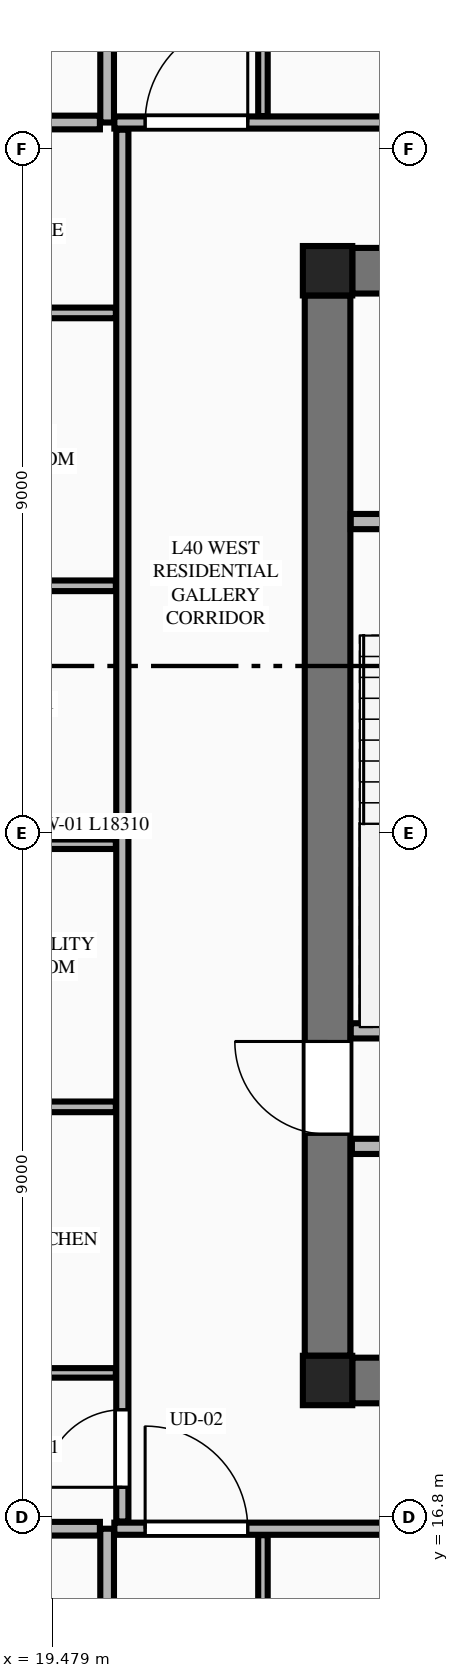
"""IFC4 building model, lengths in metres.
Left out: names, types, materials, properties, quantities, classifications, styles, units other than length and angle.
Written with IfcOpenShell. Run it as: python <this file> out.ifc"""

import sys

from ifc_helpers import new_model, si_unit, direction, frame, frame_2d, origin, origin_2d, place, context, subcontext, project, spatial, rectangle, extrude, element, fill, save


model = new_model("IFC4")
c1 = context("Model", 3, precision=1e-05, world=origin(), true_north=direction((0.0, 1.0)))
c2 = subcontext(c1, "Body", "Model", "MODEL_VIEW")
j1 = project(units=[si_unit("LENGTHUNIT", "METRE"), si_unit("PLANEANGLEUNIT", "RADIAN")], contexts=[c1])
p1 = place(None, origin())
s1 = spatial("IfcSite", under=j1, at=p1, CompositionType="ELEMENT")
p2 = place(p1, origin())
s2 = spatial("IfcBuilding", under=s1, at=p2, CompositionType="ELEMENT")
p3 = place(p2, frame((0.0, 0.0, 153.5)))
s3 = spatial("IfcBuildingStorey", under=s2, at=p3, CompositionType="ELEMENT", Elevation=153.5)
for number, where, z_axis, x_axis in (
    (1, (23.1, 18.6, 0.0), (0.0, 0.0, 1.0), (1.0, 0.0, 0.0)),
    (2, (23.1, 33.2, 0.0), (0.0, 0.0, 1.0), (1.0, 0.0, 0.0)),
):
    element("IfcColumn", number, at=place(p3, frame(where, z_axis=z_axis, x_axis=x_axis)), inside=s3, PredefinedType="COLUMN", context=c2, shape_type="SweptSolid", body=[
        extrude(rectangle(XDim=0.65, YDim=0.65, at=origin_2d()), origin(), (0.0, 0.0, 1.0), 3.55),
    ])
for number, where, z_axis, x_axis in (
    (3, (23.425, 18.6, 0.0), (0.0, 0.0, 1.0), (1.0, 0.0, 0.0)),
    (4, (23.425, 33.2, 0.0), (0.0, 0.0, 1.0), (1.0, 0.0, 0.0)),
):
    element("IfcWall", number, at=place(p3, frame(where, z_axis=z_axis, x_axis=x_axis)), inside=s3, PredefinedType="SHEAR", context=c2, shape_type="SweptSolid", body=[
        extrude(rectangle(XDim=17.95, YDim=0.6, at=frame_2d((8.975, 0.0))), origin(), (0.0, 0.0, 1.0), 3.34),
    ])
p4 = place(p3, frame((23.1, 18.925, 0.0), z_axis=(0.0, 0.0, 1.0), x_axis=(0.0, 1.0, 0.0)))
e5 = element("IfcWall", 5, at=p4, inside=s3, PredefinedType="SHEAR", context=c2, shape_type="SweptSolid", body=[
    extrude(rectangle(XDim=13.95, YDim=0.6, at=frame_2d((6.975, 0.0))), origin(), (0.0, 0.0, 1.0), 3.34),
])
p5 = place(p4, frame((2.915, 0.0, 0.0)))
e6 = element("IfcOpeningElement", 6, at=p5, cuts=e5, PredefinedType="OPENING", context=c2, shape_type="SweptSolid", body=[
    extrude(rectangle(XDim=1.22, YDim=2.25, at=frame_2d((0.61, 1.125))), frame((0.0, 0.31, 0.0), z_axis=(0.0, -1.0, 0.0), x_axis=(1.0, 0.0, 0.0)), (0.0, 0.0, 1.0), 0.62),
])
p6 = place(p3, frame((23.405, 23.2, 0.0), z_axis=(0.0, 0.0, 1.0), x_axis=(1.0, 0.0, 0.0)))
e7 = element("IfcWall", 7, at=p6, inside=s3, PredefinedType="PLUMBINGWALL", context=c2, shape_type="SweptSolid", body=[
    extrude(rectangle(XDim=3.27, YDim=0.2, at=frame_2d((1.635, 0.0))), origin(), (0.0, 0.0, 1.0), 3.34),
])
p7 = place(p3, frame((23.405, 29.9, 0.0), z_axis=(0.0, 0.0, 1.0), x_axis=(1.0, 0.0, 0.0)))
e8 = element("IfcWall", 8, at=p7, inside=s3, PredefinedType="PLUMBINGWALL", context=c2, shape_type="SweptSolid", body=[
    extrude(rectangle(XDim=3.27, YDim=0.2, at=frame_2d((1.635, 0.0))), origin(), (0.0, 0.0, 1.0), 3.34),
])
p8 = place(p7, frame((1.85, 0.0, 0.0)))
e9 = element("IfcOpeningElement", 9, at=p8, cuts=e8, PredefinedType="OPENING", context=c2, shape_type="SweptSolid", body=[
    extrude(rectangle(XDim=0.85, YDim=2.05, at=frame_2d((0.425, 1.025))), frame((0.0, 0.11, 0.0), z_axis=(0.0, -1.0, 0.0), x_axis=(1.0, 0.0, 0.0)), (0.0, 0.0, 1.0), 0.22),
])
p9 = place(p3, frame((23.42, 21.68, 0.0), z_axis=(0.0, 0.0, 1.0), x_axis=(1.0, 0.0, 0.0)))
e10 = element("IfcWall", 10, at=p9, inside=s3, PredefinedType="PLUMBINGWALL", context=c2, shape_type="SweptSolid", body=[
    extrude(rectangle(XDim=17.96, YDim=0.2, at=frame_2d((8.98, 0.0))), origin(), (0.0, 0.0, 1.0), 3.34),
])
p10 = place(p9, frame((11.6, 0.0, 0.0)))
e11 = element("IfcOpeningElement", 11, at=p10, cuts=e10, PredefinedType="OPENING", context=c2, shape_type="SweptSolid", body=[
    extrude(rectangle(XDim=1.1, YDim=2.2, at=frame_2d((0.55, 1.1))), frame((0.0, 0.11, 0.0), z_axis=(0.0, -1.0, 0.0), x_axis=(1.0, 0.0, 0.0)), (0.0, 0.0, 1.0), 0.22),
])
p11 = place(p9, frame((0.41, 0.0, 0.0)))
e12 = element("IfcOpeningElement", 12, at=p11, cuts=e10, PredefinedType="OPENING", context=c2, shape_type="SweptSolid", body=[
    extrude(rectangle(XDim=0.85, YDim=2.05, at=frame_2d((0.425, 1.025))), frame((0.0, 0.11, 0.0), z_axis=(0.0, -1.0, 0.0), x_axis=(1.0, 0.0, 0.0)), (0.0, 0.0, 1.0), 0.22),
])
p12 = place(p9, frame((4.13, 0.0, 0.0)))
e13 = element("IfcOpeningElement", 13, at=p12, cuts=e10, PredefinedType="OPENING", context=c2, shape_type="SweptSolid", body=[
    extrude(rectangle(XDim=0.85, YDim=2.05, at=frame_2d((0.425, 1.025))), frame((0.0, 0.11, 0.0), z_axis=(0.0, -1.0, 0.0), x_axis=(1.0, 0.0, 0.0)), (0.0, 0.0, 1.0), 0.22),
])
p13 = place(p9, frame((7.83, 0.0, 0.0)))
e14 = element("IfcOpeningElement", 14, at=p13, cuts=e10, PredefinedType="OPENING", context=c2, shape_type="SweptSolid", body=[
    extrude(rectangle(XDim=0.85, YDim=2.05, at=frame_2d((0.425, 1.025))), frame((0.0, 0.11, 0.0), z_axis=(0.0, -1.0, 0.0), x_axis=(1.0, 0.0, 0.0)), (0.0, 0.0, 1.0), 0.22),
])
p14 = place(p9, frame((13.78, 0.0, 0.0)))
e15 = element("IfcOpeningElement", 15, at=p14, cuts=e10, PredefinedType="OPENING", context=c2, shape_type="SweptSolid", body=[
    extrude(rectangle(XDim=0.85, YDim=2.05, at=frame_2d((0.425, 1.025))), frame((0.0, 0.11, 0.0), z_axis=(0.0, -1.0, 0.0), x_axis=(1.0, 0.0, 0.0)), (0.0, 0.0, 1.0), 0.22),
])
p15 = place(p9, frame((16.13, 0.0, 0.0)))
e16 = element("IfcOpeningElement", 16, at=p15, cuts=e10, PredefinedType="OPENING", context=c2, shape_type="SweptSolid", body=[
    extrude(rectangle(XDim=0.85, YDim=2.05, at=frame_2d((0.425, 1.025))), frame((0.0, 0.11, 0.0), z_axis=(0.0, -1.0, 0.0), x_axis=(1.0, 0.0, 0.0)), (0.0, 0.0, 1.0), 0.22),
])
p16 = place(p3, frame((20.2, 4.105, 0.0), z_axis=(0.0, 0.0, 1.0), x_axis=(0.0, 1.0, 0.0)))
e17 = element("IfcWall", 17, at=p16, inside=s3, PredefinedType="PARTITIONING", context=c2, shape_type="SweptSolid", body=[
    extrude(rectangle(XDim=12.545, YDim=0.18, at=frame_2d((6.272, 0.0))), origin(), (0.0, 0.0, 1.0), 3.34),
])
p17 = place(p3, frame((20.295, 16.65, 0.0), z_axis=(0.0, 0.0, 1.0), x_axis=(1.0, 0.0, 0.0)))
e18 = element("IfcWall", 18, at=p17, inside=s3, PredefinedType="PARTITIONING", context=c2, shape_type="SweptSolid", body=[
    extrude(rectangle(XDim=15.842, YDim=0.16, at=frame_2d((7.921, 0.0))), origin(), (0.0, 0.0, 1.0), 3.34),
])
p18 = place(p17, frame((0.405, 0.0, 0.0)))
e19 = element("IfcOpeningElement", 19, at=p18, cuts=e18, PredefinedType="OPENING", context=c2, shape_type="SweptSolid", body=[
    extrude(rectangle(XDim=1.35, YDim=2.35, at=frame_2d((0.675, 1.175))), frame((0.0, 0.09, 0.0), z_axis=(0.0, -1.0, 0.0), x_axis=(1.0, 0.0, 0.0)), (0.0, 0.0, 1.0), 0.18),
])
p19 = place(p3, frame((22.25, 9.981, 0.0), z_axis=(0.0, 0.0, 1.0), x_axis=(0.0, 1.0, 0.0)))
e20 = element("IfcWall", 20, at=p19, inside=s3, PredefinedType="PARTITIONING", context=c2, shape_type="SweptSolid", body=[
    extrude(rectangle(XDim=6.584, YDim=0.125, at=frame_2d((3.292, 0.0))), origin(), (0.0, 0.0, 1.0), 2.722),
])
p20 = place(p3, frame((20.2, 35.15, 0.0), z_axis=(0.0, 0.0, 1.0), x_axis=(0.0, 1.0, 0.0)))
e21 = element("IfcWall", 21, at=p20, inside=s3, PredefinedType="PARTITIONING", context=c2, shape_type="SweptSolid", body=[
    extrude(rectangle(XDim=12.345, YDim=0.18, at=frame_2d((6.173, 0.0))), origin(), (0.0, 0.0, 1.0), 3.34),
])
p21 = place(p3, frame((20.295, 35.15, 0.0), z_axis=(0.0, 0.0, 1.0), x_axis=(1.0, 0.0, 0.0)))
e22 = element("IfcWall", 22, at=p21, inside=s3, PredefinedType="PARTITIONING", context=c2, shape_type="SweptSolid", body=[
    extrude(rectangle(XDim=24.21, YDim=0.16, at=frame_2d((12.105, 0.0))), origin(), (0.0, 0.0, 1.0), 3.34),
])
p22 = place(p21, frame((0.405, 0.0, 0.0)))
e23 = element("IfcOpeningElement", 23, at=p22, cuts=e22, PredefinedType="OPENING", context=c2, shape_type="SweptSolid", body=[
    extrude(rectangle(XDim=1.35, YDim=2.35, at=frame_2d((0.675, 1.175))), frame((0.0, 0.09, 0.0), z_axis=(0.0, -1.0, 0.0), x_axis=(1.0, 0.0, 0.0)), (0.0, 0.0, 1.0), 0.18),
])
p23 = place(p3, frame((22.25, 35.235, 0.0), z_axis=(0.0, 0.0, 1.0), x_axis=(0.0, 1.0, 0.0)))
e24 = element("IfcWall", 24, at=p23, inside=s3, PredefinedType="PARTITIONING", context=c2, shape_type="SweptSolid", body=[
    extrude(rectangle(XDim=4.625, YDim=0.125, at=frame_2d((2.312, 0.0))), origin(), (0.0, 0.0, 1.0), 2.722),
])
p24 = place(p3, frame((12.109, 16.65, 0.0), z_axis=(0.0, 0.0, 1.0), x_axis=(1.0, 0.0, 0.0)))
e25 = element("IfcWall", 25, at=p24, inside=s3, PredefinedType="PARTITIONING", context=c2, shape_type="SweptSolid", body=[
    extrude(rectangle(XDim=7.996, YDim=0.18, at=frame_2d((3.998, 0.0))), origin(), (0.0, 0.0, 1.0), 3.34),
])
p25 = place(p3, frame((12.21, 35.15, 0.0), z_axis=(0.0, 0.0, 1.0), x_axis=(1.0, 0.0, 0.0)))
e26 = element("IfcWall", 26, at=p25, inside=s3, PredefinedType="PARTITIONING", context=c2, shape_type="SweptSolid", body=[
    extrude(rectangle(XDim=7.895, YDim=0.18, at=frame_2d((3.948, 0.0))), origin(), (0.0, 0.0, 1.0), 3.34),
])
p26 = place(p3, frame((20.4, 16.745, 0.0), z_axis=(0.0, 0.0, 1.0), x_axis=(0.0, 1.0, 0.0)))
e27 = element("IfcWall", 27, at=p26, inside=s3, PredefinedType="PARTITIONING", context=c2, shape_type="SweptSolid", body=[
    extrude(rectangle(XDim=18.31, YDim=0.16, at=frame_2d((9.155, 0.0))), origin(), (0.0, 0.0, 1.0), 3.34),
])
p27 = place(p26, frame((0.45, 0.0, 0.0)))
e28 = element("IfcOpeningElement", 28, at=p27, cuts=e27, PredefinedType="OPENING", context=c2, shape_type="SweptSolid", body=[
    extrude(rectangle(XDim=1.02, YDim=2.25, at=frame_2d((0.51, 1.125))), frame((0.0, 0.09, 0.0), z_axis=(0.0, -1.0, 0.0), x_axis=(1.0, 0.0, 0.0)), (0.0, 0.0, 1.0), 0.18),
])
p28 = place(p3, frame((16.385, 18.7, 0.0), z_axis=(0.0, 0.0, 1.0), x_axis=(1.0, 0.0, 0.0)))
e29 = element("IfcWall", 29, at=p28, inside=s3, PredefinedType="PARTITIONING", context=c2, shape_type="SweptSolid", body=[
    extrude(rectangle(XDim=3.93, YDim=0.125, at=frame_2d((1.965, 0.0))), origin(), (0.0, 0.0, 1.0), 2.722),
])
for number, where, z_axis, x_axis in (
    (30, (16.385, 29.055, 0.0), (0.0, 0.0, 1.0), (1.0, 0.0, 0.0)),
    (31, (16.385, 22.2, 0.0), (0.0, 0.0, 1.0), (1.0, 0.0, 0.0)),
):
    element("IfcWall", number, at=place(p3, frame(where, z_axis=z_axis, x_axis=x_axis)), inside=s3, PredefinedType="PLUMBINGWALL", context=c2, shape_type="SweptSolid", body=[
        extrude(rectangle(XDim=3.93, YDim=0.14, at=frame_2d((1.965, 0.0))), origin(), (0.0, 0.0, 1.0), 3.34),
    ])
p29 = place(p3, frame((16.385, 25.655, 0.0), z_axis=(0.0, 0.0, 1.0), x_axis=(1.0, 0.0, 0.0)))
e32 = element("IfcWall", 32, at=p29, inside=s3, PredefinedType="PARTITIONING", context=c2, shape_type="SweptSolid", body=[
    extrude(rectangle(XDim=3.93, YDim=0.125, at=frame_2d((1.965, 0.0))), origin(), (0.0, 0.0, 1.0), 3.34),
])
p30 = place(p3, frame((16.385, 32.645, 0.0), z_axis=(0.0, 0.0, 1.0), x_axis=(1.0, 0.0, 0.0)))
e33 = element("IfcWall", 33, at=p30, inside=s3, PredefinedType="PLUMBINGWALL", context=c2, shape_type="SweptSolid", body=[
    extrude(rectangle(XDim=3.93, YDim=0.14, at=frame_2d((1.965, 0.0))), origin(), (0.0, 0.0, 1.0), 3.34),
])
p31 = place(p5, origin())
e34 = element("IfcDoor", 34, at=p31, inside=s3, OperationType="SINGLE_SWING_RIGHT", PredefinedType="DOOR", context=c2, shape_type="SweptSolid", body=[
    extrude(rectangle(XDim=1.22, YDim=2.25, at=frame_2d((0.61, 1.125))), frame((0.0, 0.025, 0.0), z_axis=(0.0, -1.0, 0.0), x_axis=(1.0, 0.0, 0.0)), (0.0, 0.0, 1.0), 0.05),
])
fill(e6, e34)
p32 = place(p18, origin())
e35 = element("IfcDoor", 35, at=p32, inside=s3, OperationType="SINGLE_SWING_LEFT", PredefinedType="DOOR", context=c2, shape_type="SweptSolid", body=[
    extrude(rectangle(XDim=1.35, YDim=2.35, at=frame_2d((0.675, 1.175))), frame((0.0, 0.025, 0.0), z_axis=(0.0, -1.0, 0.0), x_axis=(1.0, 0.0, 0.0)), (0.0, 0.0, 1.0), 0.05),
])
fill(e19, e35)
p33 = place(p22, origin())
e36 = element("IfcDoor", 36, at=p33, inside=s3, OperationType="SINGLE_SWING_RIGHT", PredefinedType="DOOR", context=c2, shape_type="SweptSolid", body=[
    extrude(rectangle(XDim=1.35, YDim=2.35, at=frame_2d((0.675, 1.175))), frame((0.0, 0.025, 0.0), z_axis=(0.0, -1.0, 0.0), x_axis=(1.0, 0.0, 0.0)), (0.0, 0.0, 1.0), 0.05),
])
fill(e23, e36)
p34 = place(p27, origin())
e37 = element("IfcDoor", 37, at=p34, inside=s3, OperationType="SINGLE_SWING_LEFT", PredefinedType="DOOR", context=c2, shape_type="SweptSolid", body=[
    extrude(rectangle(XDim=1.02, YDim=2.25, at=frame_2d((0.51, 1.125))), frame((0.0, 0.025, 0.0), z_axis=(0.0, -1.0, 0.0), x_axis=(1.0, 0.0, 0.0)), (0.0, 0.0, 1.0), 0.05),
])
fill(e28, e37)
save(model, sys.argv[1])
